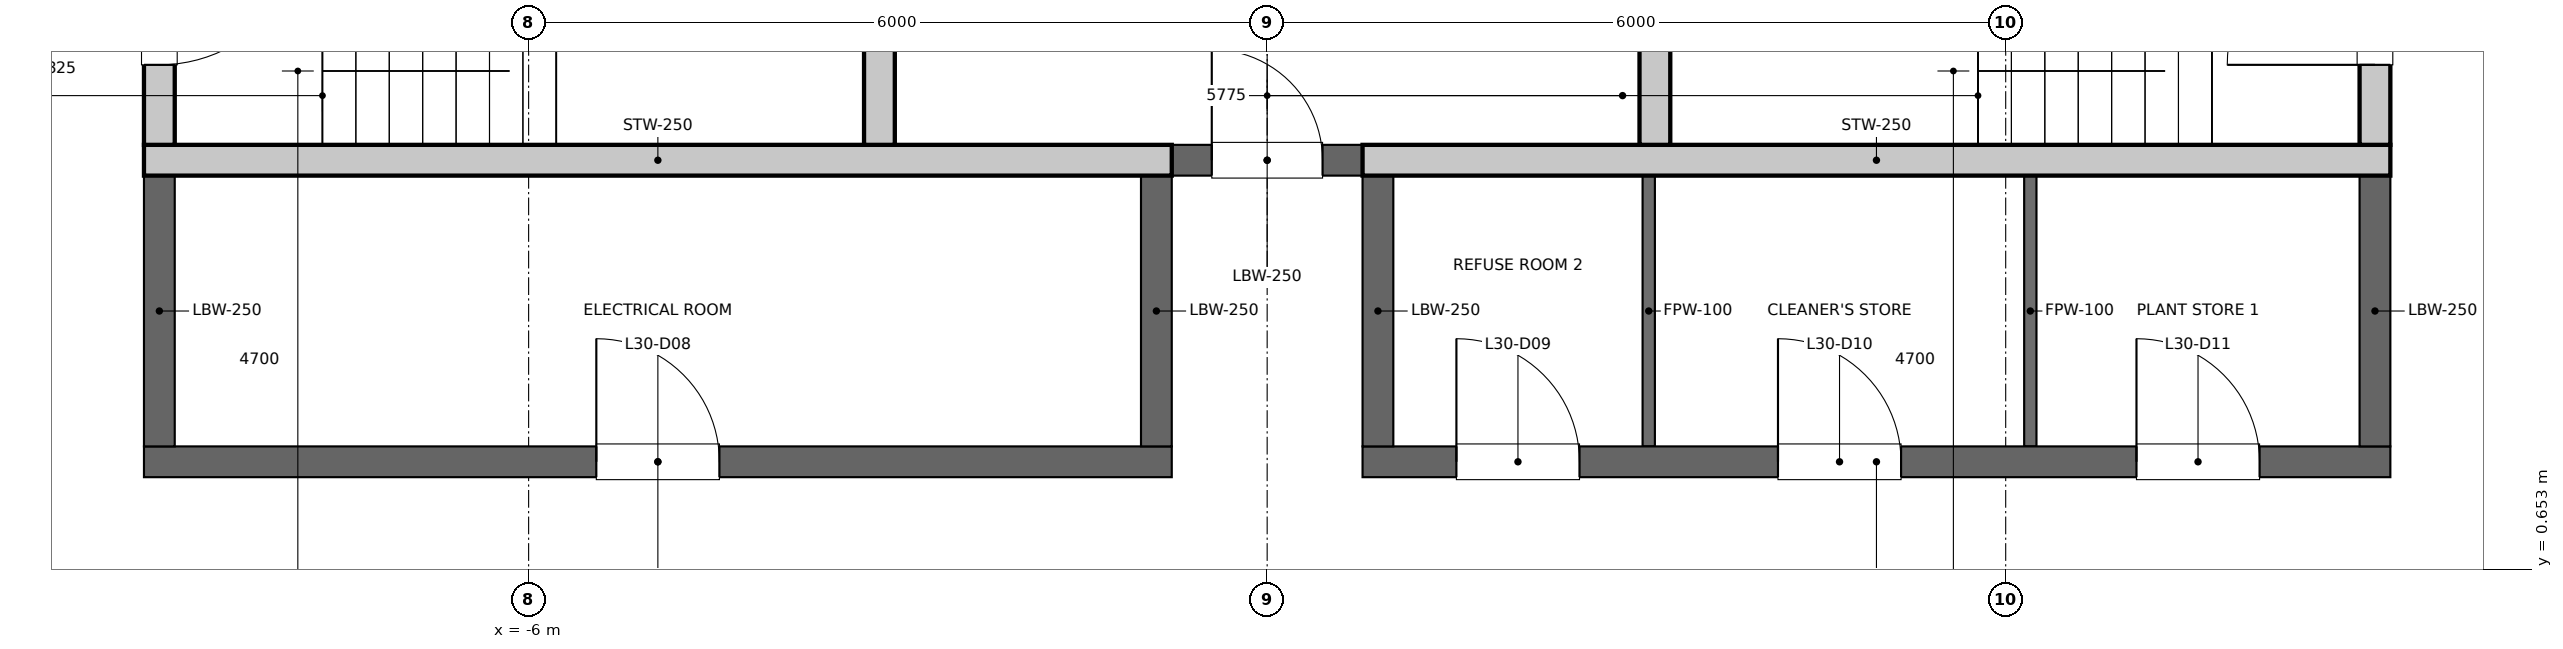
"""IFC4 building model, lengths in metres.
Left out: names, types, materials, properties, quantities, classifications, styles, units other than length and angle.
Written with IfcOpenShell. Run it as: python <this file> out.ifc"""

import sys

from ifc_helpers import new_model, si_unit, direction, frame, frame_2d, origin, place, context, subcontext, project, spatial, rectangle, extrude, element, fill, save


model = new_model("IFC4")
c1 = context("Model", 3, precision=1e-05, world=origin(), true_north=direction((0.0, 1.0)))
c2 = subcontext(c1, "Body", "Model", "MODEL_VIEW")
j1 = project(units=[si_unit("LENGTHUNIT", "METRE"), si_unit("PLANEANGLEUNIT", "RADIAN")], contexts=[c1])
p1 = place(None, origin())
s1 = spatial("IfcSite", under=j1, at=p1, CompositionType="ELEMENT")
p2 = place(p1, origin())
s2 = spatial("IfcBuilding", under=s1, at=p2, CompositionType="ELEMENT")
p3 = place(p2, frame((0.0, 0.0, 148.2)))
s3 = spatial("IfcBuildingStorey", under=s2, at=p3, CompositionType="ELEMENT", Elevation=148.2)
p4 = place(p3, frame((-9.0, 4.1, 0.0), z_axis=(0.0, 0.0, 1.0), x_axis=(0.0, 1.0, 0.0)))
e1 = element("IfcWall", 1, at=p4, inside=s3, PredefinedType="SOLIDWALL", context=c2, shape_type="SweptSolid", body=[
    extrude(rectangle(XDim=2.5, YDim=0.25, at=frame_2d((1.25, 0.0))), origin(), (0.0, 0.0, 1.0), 5.25),
])
p5 = place(p4, frame((0.65, 0.0, 0.0)))
e2 = element("IfcOpeningElement", 2, at=p5, cuts=e1, PredefinedType="OPENING", context=c2, shape_type="SweptSolid", body=[
    extrude(rectangle(XDim=1.2, YDim=2.1, at=frame_2d((0.6, 1.05))), frame((0.0, 0.125, 0.0), z_axis=(0.0, -1.0, 0.0), x_axis=(1.0, 0.0, 0.0)), (0.0, 0.0, 1.0), 0.25),
])
p6 = place(p3, frame((9.0, 4.1, 0.0), z_axis=(0.0, 0.0, 1.0), x_axis=(0.0, 1.0, 0.0)))
e3 = element("IfcWall", 3, at=p6, inside=s3, PredefinedType="SOLIDWALL", context=c2, shape_type="SweptSolid", body=[
    extrude(rectangle(XDim=2.5, YDim=0.25, at=frame_2d((1.25, 0.0))), origin(), (0.0, 0.0, 1.0), 5.25),
])
p7 = place(p6, frame((0.65, 0.0, 0.0)))
e4 = element("IfcOpeningElement", 4, at=p7, cuts=e3, PredefinedType="OPENING", context=c2, shape_type="SweptSolid", body=[
    extrude(rectangle(XDim=1.2, YDim=2.1, at=frame_2d((0.6, 1.05))), frame((0.0, 0.125, 0.0), z_axis=(0.0, -1.0, 0.0), x_axis=(1.0, 0.0, 0.0)), (0.0, 0.0, 1.0), 0.25),
])
for number, where, z_axis, x_axis in (
    (5, (-3.15, 4.1, 0.0), (0.0, 0.0, 1.0), (0.0, 1.0, 0.0)),
    (6, (3.15, 4.1, 0.0), (0.0, 0.0, 1.0), (0.0, 1.0, 0.0)),
):
    element("IfcWall", number, at=place(p3, frame(where, z_axis=z_axis, x_axis=x_axis)), inside=s3, PredefinedType="SOLIDWALL", context=c2, shape_type="SweptSolid", body=[
        extrude(rectangle(XDim=2.5, YDim=0.25, at=frame_2d((1.25, 0.0))), origin(), (0.0, 0.0, 1.0), 5.25),
    ])
p8 = place(p3, frame((-0.775, 3.975, 0.0), z_axis=(0.0, 0.0, 1.0), x_axis=(1.0, 0.0, 0.0)))
e7 = element("IfcWall", 7, at=p8, inside=s3, PredefinedType="PARTITIONING", context=c2, shape_type="SweptSolid", body=[
    extrude(rectangle(XDim=1.55, YDim=0.25, at=frame_2d((0.775, 0.0))), origin(), (0.0, 0.0, 1.0), 5.25),
])
p9 = place(p8, frame((0.325, 0.0, 0.0)))
e8 = element("IfcOpeningElement", 8, at=p9, cuts=e7, PredefinedType="OPENING", context=c2, shape_type="SweptSolid", body=[
    extrude(rectangle(XDim=0.9, YDim=2.1, at=frame_2d((0.45, 1.05))), frame((0.0, 0.125, 0.0), z_axis=(0.0, -1.0, 0.0), x_axis=(1.0, 0.0, 0.0)), (0.0, 0.0, 1.0), 0.25),
])
p10 = place(p3, frame((-9.125, 1.525, 0.0), z_axis=(0.0, 0.0, 1.0), x_axis=(1.0, 0.0, 0.0)))
e9 = element("IfcWall", 9, at=p10, inside=s3, PredefinedType="PARTITIONING", context=c2, shape_type="SweptSolid", body=[
    extrude(rectangle(XDim=8.35, YDim=0.25, at=frame_2d((4.175, 0.0))), origin(), (0.0, 0.0, 1.0), 5.25),
])
p11 = place(p10, frame((3.675, 0.0, 0.0)))
e10 = element("IfcOpeningElement", 10, at=p11, cuts=e9, PredefinedType="OPENING", context=c2, shape_type="SweptSolid", body=[
    extrude(rectangle(XDim=1.0, YDim=2.1, at=frame_2d((0.5, 1.05))), frame((0.0, 0.125, 0.0), z_axis=(0.0, -1.0, 0.0), x_axis=(1.0, 0.0, 0.0)), (0.0, 0.0, 1.0), 0.25),
])
p12 = place(p3, frame((0.775, 1.525, 0.0), z_axis=(0.0, 0.0, 1.0), x_axis=(1.0, 0.0, 0.0)))
e11 = element("IfcWall", 11, at=p12, inside=s3, PredefinedType="PARTITIONING", context=c2, shape_type="SweptSolid", body=[
    extrude(rectangle(XDim=8.35, YDim=0.25, at=frame_2d((4.175, 0.0))), origin(), (0.0, 0.0, 1.0), 5.25),
])
p13 = place(p12, frame((0.762, 0.0, 0.0)))
e12 = element("IfcOpeningElement", 12, at=p13, cuts=e11, PredefinedType="OPENING", context=c2, shape_type="SweptSolid", body=[
    extrude(rectangle(XDim=1.0, YDim=2.1, at=frame_2d((0.5, 1.05))), frame((0.0, 0.125, 0.0), z_axis=(0.0, -1.0, 0.0), x_axis=(1.0, 0.0, 0.0)), (0.0, 0.0, 1.0), 0.25),
])
p14 = place(p12, frame((3.375, 0.0, 0.0)))
e13 = element("IfcOpeningElement", 13, at=p14, cuts=e11, PredefinedType="OPENING", context=c2, shape_type="SweptSolid", body=[
    extrude(rectangle(XDim=1.0, YDim=2.1, at=frame_2d((0.5, 1.05))), frame((0.0, 0.125, 0.0), z_axis=(0.0, -1.0, 0.0), x_axis=(1.0, 0.0, 0.0)), (0.0, 0.0, 1.0), 0.25),
])
p15 = place(p12, frame((6.288, 0.0, 0.0)))
e14 = element("IfcOpeningElement", 14, at=p15, cuts=e11, PredefinedType="OPENING", context=c2, shape_type="SweptSolid", body=[
    extrude(rectangle(XDim=1.0, YDim=2.1, at=frame_2d((0.5, 1.05))), frame((0.0, 0.125, 0.0), z_axis=(0.0, -1.0, 0.0), x_axis=(1.0, 0.0, 0.0)), (0.0, 0.0, 1.0), 0.25),
])
for number, where, z_axis, x_axis in (
    (15, (-9.125, 3.975, 0.0), (0.0, 0.0, 1.0), (1.0, 0.0, 0.0)),
    (16, (0.775, 3.975, 0.0), (0.0, 0.0, 1.0), (1.0, 0.0, 0.0)),
):
    element("IfcWall", number, at=place(p3, frame(where, z_axis=z_axis, x_axis=x_axis)), inside=s3, PredefinedType="SOLIDWALL", context=c2, shape_type="SweptSolid", body=[
        extrude(rectangle(XDim=8.35, YDim=0.25, at=frame_2d((4.175, 0.0))), origin(), (0.0, 0.0, 1.0), 5.25),
    ])
for number, where, z_axis, x_axis in (
    (17, (-9.0, 1.65, 0.0), (0.0, 0.0, 1.0), (0.0, 1.0, 0.0)),
    (18, (-0.9, 1.65, 0.0), (0.0, 0.0, 1.0), (0.0, 1.0, 0.0)),
    (19, (9.0, 1.65, 0.0), (0.0, 0.0, 1.0), (0.0, 1.0, 0.0)),
    (20, (0.9, 1.65, 0.0), (0.0, 0.0, 1.0), (0.0, 1.0, 0.0)),
):
    element("IfcWall", number, at=place(p3, frame(where, z_axis=z_axis, x_axis=x_axis)), inside=s3, PredefinedType="PARTITIONING", context=c2, shape_type="SweptSolid", body=[
        extrude(rectangle(XDim=2.2, YDim=0.25, at=frame_2d((1.1, 0.0))), origin(), (0.0, 0.0, 1.0), 5.25),
    ])
for number, where, z_axis, x_axis in (
    (21, (3.1, 1.65, 0.0), (0.0, 0.0, 1.0), (0.0, 1.0, 0.0)),
    (22, (6.2, 1.65, 0.0), (0.0, 0.0, 1.0), (0.0, 1.0, 0.0)),
):
    element("IfcWall", number, at=place(p3, frame(where, z_axis=z_axis, x_axis=x_axis)), inside=s3, PredefinedType="PARTITIONING", context=c2, shape_type="SweptSolid", body=[
        extrude(rectangle(XDim=2.2, YDim=0.1, at=frame_2d((1.1, 0.0))), origin(), (0.0, 0.0, 1.0), 5.25),
    ])
p16 = place(p5, origin())
e23 = element("IfcDoor", 23, at=p16, inside=s3, OperationType="SINGLE_SWING_RIGHT", PredefinedType="DOOR", context=c2, shape_type="SweptSolid", body=[
    extrude(rectangle(XDim=1.2, YDim=2.1, at=frame_2d((0.6, 1.05))), frame((0.0, 0.025, 0.0), z_axis=(0.0, -1.0, 0.0), x_axis=(1.0, 0.0, 0.0)), (0.0, 0.0, 1.0), 0.05),
])
fill(e2, e23)
p17 = place(p7, origin())
e24 = element("IfcDoor", 24, at=p17, inside=s3, OperationType="SINGLE_SWING_LEFT", PredefinedType="DOOR", context=c2, shape_type="SweptSolid", body=[
    extrude(rectangle(XDim=1.2, YDim=2.1, at=frame_2d((0.6, 1.05))), frame((0.0, 0.025, 0.0), z_axis=(0.0, -1.0, 0.0), x_axis=(1.0, 0.0, 0.0)), (0.0, 0.0, 1.0), 0.05),
])
fill(e4, e24)
p18 = place(p9, origin())
e25 = element("IfcDoor", 25, at=p18, inside=s3, OperationType="SINGLE_SWING_LEFT", PredefinedType="DOOR", context=c2, shape_type="SweptSolid", body=[
    extrude(rectangle(XDim=0.9, YDim=2.1, at=frame_2d((0.45, 1.05))), frame((0.0, 0.025, 0.0), z_axis=(0.0, -1.0, 0.0), x_axis=(1.0, 0.0, 0.0)), (0.0, 0.0, 1.0), 0.05),
])
fill(e8, e25)
p19 = place(p11, origin())
e26 = element("IfcDoor", 26, at=p19, inside=s3, OperationType="SINGLE_SWING_LEFT", PredefinedType="DOOR", context=c2, shape_type="SweptSolid", body=[
    extrude(rectangle(XDim=1.0, YDim=2.1, at=frame_2d((0.5, 1.05))), frame((0.0, 0.025, 0.0), z_axis=(0.0, -1.0, 0.0), x_axis=(1.0, 0.0, 0.0)), (0.0, 0.0, 1.0), 0.05),
])
fill(e10, e26)
p20 = place(p13, origin())
e27 = element("IfcDoor", 27, at=p20, inside=s3, OperationType="SINGLE_SWING_LEFT", PredefinedType="DOOR", context=c2, shape_type="SweptSolid", body=[
    extrude(rectangle(XDim=1.0, YDim=2.1, at=frame_2d((0.5, 1.05))), frame((0.0, 0.025, 0.0), z_axis=(0.0, -1.0, 0.0), x_axis=(1.0, 0.0, 0.0)), (0.0, 0.0, 1.0), 0.05),
])
fill(e12, e27)
p21 = place(p14, origin())
e28 = element("IfcDoor", 28, at=p21, inside=s3, OperationType="SINGLE_SWING_LEFT", PredefinedType="DOOR", context=c2, shape_type="SweptSolid", body=[
    extrude(rectangle(XDim=1.0, YDim=2.1, at=frame_2d((0.5, 1.05))), frame((0.0, 0.025, 0.0), z_axis=(0.0, -1.0, 0.0), x_axis=(1.0, 0.0, 0.0)), (0.0, 0.0, 1.0), 0.05),
])
fill(e13, e28)
p22 = place(p15, origin())
e29 = element("IfcDoor", 29, at=p22, inside=s3, OperationType="SINGLE_SWING_LEFT", PredefinedType="DOOR", context=c2, shape_type="SweptSolid", body=[
    extrude(rectangle(XDim=1.0, YDim=2.1, at=frame_2d((0.5, 1.05))), frame((0.0, 0.025, 0.0), z_axis=(0.0, -1.0, 0.0), x_axis=(1.0, 0.0, 0.0)), (0.0, 0.0, 1.0), 0.05),
])
fill(e14, e29)
save(model, sys.argv[1])
